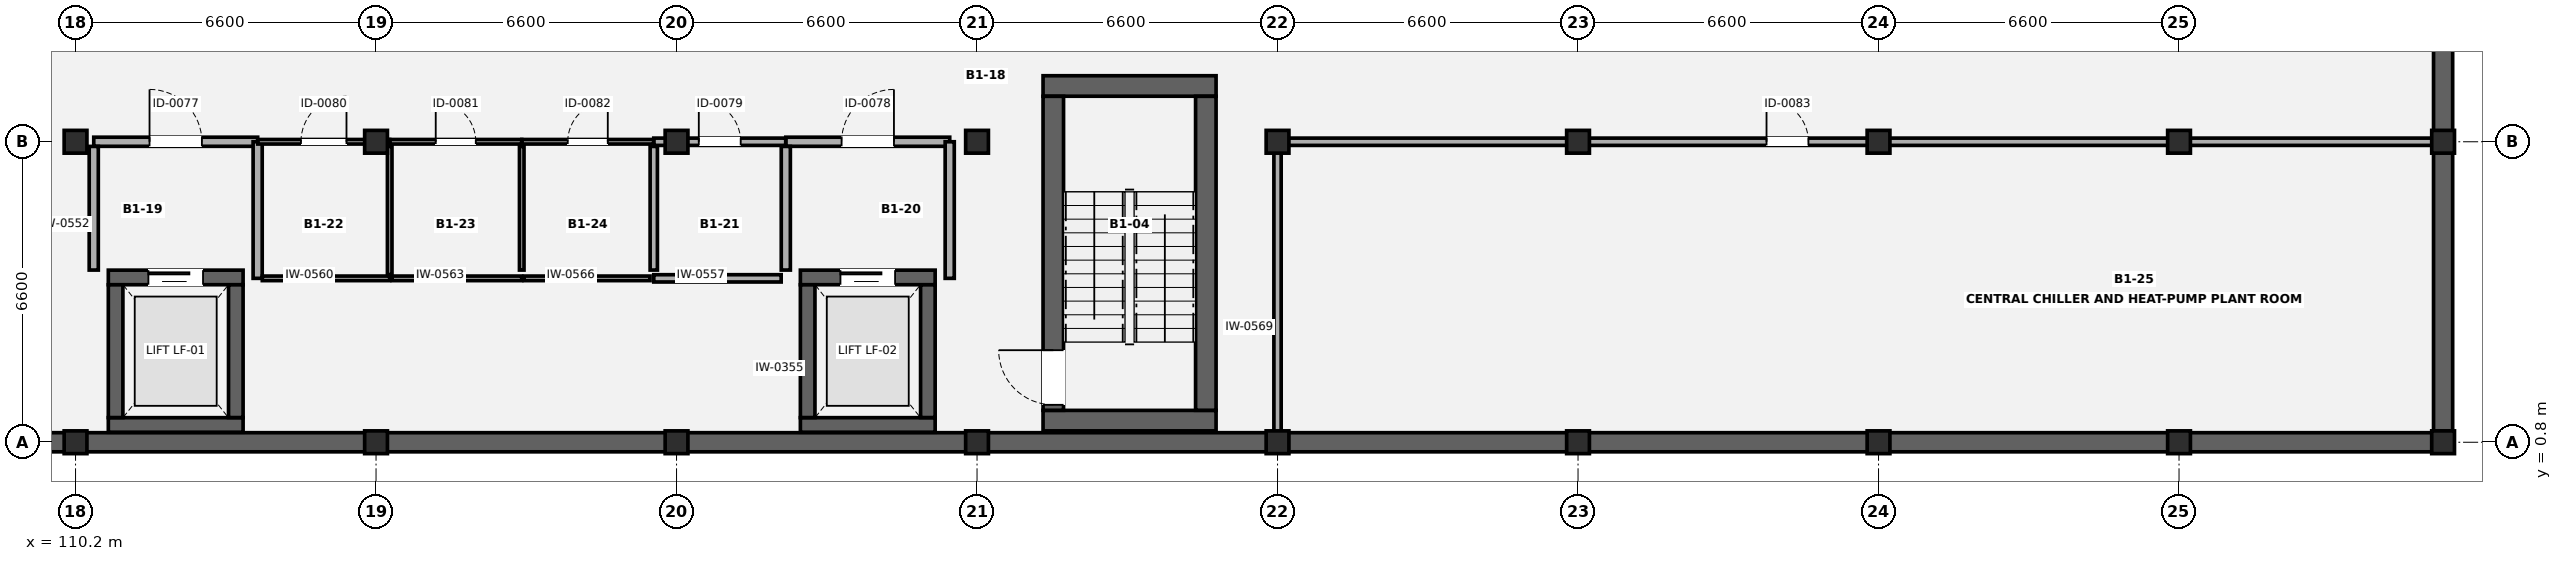
"""IFC4 building model, lengths in metres.
Left out: names, types, materials, properties, quantities, classifications, styles, units other than length and angle.
Written with IfcOpenShell. Run it as: python <this file> out.ifc"""

import sys

from ifc_helpers import new_model, si_unit, direction, frame, frame_2d, origin, origin_2d, place, context, subcontext, project, spatial, rectangle, i_section, extrude, element, fill, save


model = new_model("IFC4")
c1 = context("Model", 3, precision=1e-05, world=origin(), true_north=direction((0.0, 1.0)))
c2 = subcontext(c1, "Body", "Model", "MODEL_VIEW")
j1 = project(units=[si_unit("LENGTHUNIT", "METRE"), si_unit("PLANEANGLEUNIT", "RADIAN")], contexts=[c1])
p1 = place(None, origin())
s1 = spatial("IfcSite", under=j1, at=p1, CompositionType="ELEMENT")
p2 = place(p1, origin())
s2 = spatial("IfcBuilding", under=s1, at=p2, CompositionType="ELEMENT")
p3 = place(p2, frame((0.0, 0.0, -4.2)))
s3 = spatial("IfcBuildingStorey", under=s2, at=p3, CompositionType="ELEMENT", Elevation=-4.2)
for number, where, z_axis, x_axis in (
    (1, (110.2, 0.8, 0.0), (0.0, 0.0, 1.0), (1.0, 0.0, 0.0)),
    (2, (110.2, 7.4, 0.0), (0.0, 0.0, 1.0), (1.0, 0.0, 0.0)),
    (3, (116.8, 0.8, 0.0), (0.0, 0.0, 1.0), (1.0, 0.0, 0.0)),
    (4, (116.8, 7.4, 0.0), (0.0, 0.0, 1.0), (1.0, 0.0, 0.0)),
    (5, (123.4, 0.8, 0.0), (0.0, 0.0, 1.0), (1.0, 0.0, 0.0)),
    (6, (123.4, 7.4, 0.0), (0.0, 0.0, 1.0), (1.0, 0.0, 0.0)),
    (7, (130.0, 0.8, 0.0), (0.0, 0.0, 1.0), (1.0, 0.0, 0.0)),
    (8, (130.0, 7.4, 0.0), (0.0, 0.0, 1.0), (1.0, 0.0, 0.0)),
    (9, (136.6, 0.8, 0.0), (0.0, 0.0, 1.0), (1.0, 0.0, 0.0)),
    (10, (136.6, 7.4, 0.0), (0.0, 0.0, 1.0), (1.0, 0.0, 0.0)),
    (11, (143.2, 0.8, 0.0), (0.0, 0.0, 1.0), (1.0, 0.0, 0.0)),
    (12, (143.2, 7.4, 0.0), (0.0, 0.0, 1.0), (1.0, 0.0, 0.0)),
    (13, (149.8, 0.8, 0.0), (0.0, 0.0, 1.0), (1.0, 0.0, 0.0)),
    (14, (149.8, 7.4, 0.0), (0.0, 0.0, 1.0), (1.0, 0.0, 0.0)),
    (15, (156.4, 0.8, 0.0), (0.0, 0.0, 1.0), (1.0, 0.0, 0.0)),
    (16, (156.4, 7.4, 0.0), (0.0, 0.0, 1.0), (1.0, 0.0, 0.0)),
    (17, (162.2, 0.8, 0.0), (0.0, 0.0, 1.0), (1.0, 0.0, 0.0)),
    (18, (162.2, 7.4, 0.0), (0.0, 0.0, 1.0), (1.0, 0.0, 0.0)),
):
    element("IfcColumn", number, at=place(p3, frame(where, z_axis=z_axis, x_axis=x_axis)), inside=s3, PredefinedType="COLUMN", context=c2, shape_type="SweptSolid", body=[
        extrude(i_section(OverallWidth=0.5, OverallDepth=0.5, WebThickness=0.022, FlangeThickness=0.04, FilletRadius=0.016, at=origin_2d()), origin(), (0.0, 0.0, 1.0), 4.2),
    ])
p4 = place(p3, frame((162.2, 20.352, 0.0), z_axis=(0.0, 0.0, 1.0), x_axis=(0.0, -1.0, 0.0)))
e19 = element("IfcWall", 19, at=p4, inside=s3, PredefinedType="USERDEFINED", context=c2, shape_type="SweptSolid", body=[
    extrude(rectangle(XDim=19.304, YDim=0.42, at=frame_2d((9.652, 0.0))), origin(), (0.0, 0.0, 1.0), 3.85),
])
p5 = place(p3, frame((161.952, 0.8, 0.0), z_axis=(0.0, 0.0, 1.0), x_axis=(-1.0, 0.0, 0.0)))
e20 = element("IfcWall", 20, at=p5, inside=s3, PredefinedType="USERDEFINED", context=c2, shape_type="SweptSolid", body=[
    extrude(rectangle(XDim=58.104, YDim=0.42, at=frame_2d((29.052, 0.0))), origin(), (0.0, 0.0, 1.0), 3.85),
])
for number, where, z_axis, x_axis in (
    (21, (131.45, 1.275, 0.0), (0.0, 0.0, 1.0), (1.0, 0.0, 0.0)),
    (22, (131.45, 8.625, 0.0), (0.0, 0.0, 1.0), (1.0, 0.0, 0.0)),
):
    element("IfcWall", number, at=place(p3, frame(where, z_axis=z_axis, x_axis=x_axis)), inside=s3, PredefinedType="SHEAR", context=c2, shape_type="SweptSolid", body=[
        extrude(rectangle(XDim=3.8, YDim=0.45, at=frame_2d((1.9, 0.0))), origin(), (0.0, 0.0, 1.0), 3.94),
    ])
p6 = place(p3, frame((131.675, 1.502, 0.0), z_axis=(0.0, 0.0, 1.0), x_axis=(0.0, 1.0, 0.0)))
e23 = element("IfcWall", 23, at=p6, inside=s3, PredefinedType="SHEAR", context=c2, shape_type="SweptSolid", body=[
    extrude(rectangle(XDim=6.896, YDim=0.45, at=frame_2d((3.448, 0.0))), origin(), (0.0, 0.0, 1.0), 3.94),
])
p7 = place(p6, frame((0.12, 0.0, 0.0)))
e24 = element("IfcOpeningElement", 24, at=p7, cuts=e23, PredefinedType="OPENING", context=c2, shape_type="SweptSolid", body=[
    extrude(rectangle(XDim=1.2, YDim=2.15, at=frame_2d((0.6, 1.075))), frame((0.0, 0.235, 0.0), z_axis=(0.0, -1.0, 0.0), x_axis=(1.0, 0.0, 0.0)), (0.0, 0.0, 1.0), 0.47),
])
p8 = place(p3, frame((135.025, 1.502, 0.0), z_axis=(0.0, 0.0, 1.0), x_axis=(0.0, 1.0, 0.0)))
e25 = element("IfcWall", 25, at=p8, inside=s3, PredefinedType="SHEAR", context=c2, shape_type="SweptSolid", body=[
    extrude(rectangle(XDim=6.896, YDim=0.45, at=frame_2d((3.448, 0.0))), origin(), (0.0, 0.0, 1.0), 3.94),
])
p9 = place(p3, frame((110.92, 1.18, 0.0), z_axis=(0.0, 0.0, 1.0), x_axis=(1.0, 0.0, 0.0)))
e26 = element("IfcWall", 26, at=p9, inside=s3, PredefinedType="SHEAR", context=c2, shape_type="SweptSolid", body=[
    extrude(rectangle(XDim=2.96, YDim=0.32, at=frame_2d((1.48, 0.0))), origin(), (0.0, 0.0, 1.0), 3.94),
])
p10 = place(p3, frame((110.92, 4.42, 0.0), z_axis=(0.0, 0.0, 1.0), x_axis=(1.0, 0.0, 0.0)))
e27 = element("IfcWall", 27, at=p10, inside=s3, PredefinedType="SHEAR", context=c2, shape_type="SweptSolid", body=[
    extrude(rectangle(XDim=2.96, YDim=0.32, at=frame_2d((1.48, 0.0))), origin(), (0.0, 0.0, 1.0), 3.94),
])
p11 = place(p10, frame((0.88, 0.0, 0.0)))
e28 = element("IfcOpeningElement", 28, at=p11, cuts=e27, PredefinedType="OPENING", context=c2, shape_type="SweptSolid", body=[
    extrude(rectangle(XDim=1.2, YDim=2.2, at=frame_2d((0.6, 1.1))), frame((0.0, 0.17, 0.0), z_axis=(0.0, -1.0, 0.0), x_axis=(1.0, 0.0, 0.0)), (0.0, 0.0, 1.0), 0.34),
])
for number, where, z_axis, x_axis in (
    (29, (111.08, 1.342, 0.0), (0.0, 0.0, 1.0), (0.0, 1.0, 0.0)),
    (30, (113.72, 1.342, 0.0), (0.0, 0.0, 1.0), (0.0, 1.0, 0.0)),
):
    element("IfcWall", number, at=place(p3, frame(where, z_axis=z_axis, x_axis=x_axis)), inside=s3, PredefinedType="SHEAR", context=c2, shape_type="SweptSolid", body=[
        extrude(rectangle(XDim=2.916, YDim=0.32, at=frame_2d((1.458, 0.0))), origin(), (0.0, 0.0, 1.0), 3.94),
    ])
p12 = place(p3, frame((126.12, 1.18, 0.0), z_axis=(0.0, 0.0, 1.0), x_axis=(1.0, 0.0, 0.0)))
e31 = element("IfcWall", 31, at=p12, inside=s3, PredefinedType="SHEAR", context=c2, shape_type="SweptSolid", body=[
    extrude(rectangle(XDim=2.96, YDim=0.32, at=frame_2d((1.48, 0.0))), origin(), (0.0, 0.0, 1.0), 3.94),
])
p13 = place(p3, frame((126.12, 4.42, 0.0), z_axis=(0.0, 0.0, 1.0), x_axis=(1.0, 0.0, 0.0)))
e32 = element("IfcWall", 32, at=p13, inside=s3, PredefinedType="SHEAR", context=c2, shape_type="SweptSolid", body=[
    extrude(rectangle(XDim=2.96, YDim=0.32, at=frame_2d((1.48, 0.0))), origin(), (0.0, 0.0, 1.0), 3.94),
])
p14 = place(p13, frame((0.88, 0.0, 0.0)))
e33 = element("IfcOpeningElement", 33, at=p14, cuts=e32, PredefinedType="OPENING", context=c2, shape_type="SweptSolid", body=[
    extrude(rectangle(XDim=1.2, YDim=2.2, at=frame_2d((0.6, 1.1))), frame((0.0, 0.17, 0.0), z_axis=(0.0, -1.0, 0.0), x_axis=(1.0, 0.0, 0.0)), (0.0, 0.0, 1.0), 0.34),
])
for number, where, z_axis, x_axis in (
    (34, (126.28, 1.342, 0.0), (0.0, 0.0, 1.0), (0.0, 1.0, 0.0)),
    (35, (128.92, 1.342, 0.0), (0.0, 0.0, 1.0), (0.0, 1.0, 0.0)),
):
    element("IfcWall", number, at=place(p3, frame(where, z_axis=z_axis, x_axis=x_axis)), inside=s3, PredefinedType="SHEAR", context=c2, shape_type="SweptSolid", body=[
        extrude(rectangle(XDim=2.916, YDim=0.32, at=frame_2d((1.458, 0.0))), origin(), (0.0, 0.0, 1.0), 3.94),
    ])
p15 = place(p3, frame((110.6, 7.4, 0.0), z_axis=(0.0, 0.0, 1.0), x_axis=(1.0, 0.0, 0.0)))
e36 = element("IfcWall", 36, at=p15, inside=s3, PredefinedType="SOLIDWALL", context=c2, shape_type="SweptSolid", body=[
    extrude(rectangle(XDim=3.6, YDim=0.2, at=frame_2d((1.8, 0.0))), origin(), (0.0, 0.0, 1.0), 3.293),
])
p16 = place(p15, frame((1.225, 0.0, 0.0)))
e37 = element("IfcOpeningElement", 37, at=p16, cuts=e36, PredefinedType="OPENING", context=c2, shape_type="SweptSolid", body=[
    extrude(rectangle(XDim=1.15, YDim=2.15, at=frame_2d((0.575, 1.075))), frame((0.0, 0.11, 0.0), z_axis=(0.0, -1.0, 0.0), x_axis=(1.0, 0.0, 0.0)), (0.0, 0.0, 1.0), 0.22),
])
p17 = place(p3, frame((110.6, 4.582, 0.0), z_axis=(0.0, 0.0, 1.0), x_axis=(0.0, 1.0, 0.0)))
e38 = element("IfcWall", 38, at=p17, inside=s3, PredefinedType="SOLIDWALL", context=c2, shape_type="SweptSolid", body=[
    extrude(rectangle(XDim=2.716, YDim=0.2, at=frame_2d((1.358, 0.0))), origin(), (0.0, 0.0, 1.0), 3.94),
])
p18 = place(p3, frame((114.2, 4.4, 0.0), z_axis=(0.0, 0.0, 1.0), x_axis=(0.0, 1.0, 0.0)))
e39 = element("IfcWall", 39, at=p18, inside=s3, PredefinedType="SOLIDWALL", context=c2, shape_type="SweptSolid", body=[
    extrude(rectangle(XDim=3.0, YDim=0.2, at=frame_2d((1.5, 0.0))), origin(), (0.0, 0.0, 1.0), 3.94),
])
p19 = place(p3, frame((125.8, 7.4, 0.0), z_axis=(0.0, 0.0, 1.0), x_axis=(1.0, 0.0, 0.0)))
e40 = element("IfcWall", 40, at=p19, inside=s3, PredefinedType="SOLIDWALL", context=c2, shape_type="SweptSolid", body=[
    extrude(rectangle(XDim=3.6, YDim=0.2, at=frame_2d((1.8, 0.0))), origin(), (0.0, 0.0, 1.0), 3.293),
])
p20 = place(p19, frame((1.225, 0.0, 0.0)))
e41 = element("IfcOpeningElement", 41, at=p20, cuts=e40, PredefinedType="OPENING", context=c2, shape_type="SweptSolid", body=[
    extrude(rectangle(XDim=1.15, YDim=2.15, at=frame_2d((0.575, 1.075))), frame((0.0, 0.11, 0.0), z_axis=(0.0, -1.0, 0.0), x_axis=(1.0, 0.0, 0.0)), (0.0, 0.0, 1.0), 0.22),
])
p21 = place(p3, frame((125.8, 4.582, 0.0), z_axis=(0.0, 0.0, 1.0), x_axis=(0.0, 1.0, 0.0)))
e42 = element("IfcWall", 42, at=p21, inside=s3, PredefinedType="SOLIDWALL", context=c2, shape_type="SweptSolid", body=[
    extrude(rectangle(XDim=2.716, YDim=0.2, at=frame_2d((1.358, 0.0))), origin(), (0.0, 0.0, 1.0), 3.94),
])
p22 = place(p3, frame((129.4, 4.4, 0.0), z_axis=(0.0, 0.0, 1.0), x_axis=(0.0, 1.0, 0.0)))
e43 = element("IfcWall", 43, at=p22, inside=s3, PredefinedType="SOLIDWALL", context=c2, shape_type="SweptSolid", body=[
    extrude(rectangle(XDim=3.0, YDim=0.2, at=frame_2d((1.5, 0.0))), origin(), (0.0, 0.0, 1.0), 3.94),
])
p23 = place(p3, frame((122.9, 4.4, 0.0), z_axis=(0.0, 0.0, 1.0), x_axis=(1.0, 0.0, 0.0)))
e44 = element("IfcWall", 44, at=p23, inside=s3, PredefinedType="PARTITIONING", context=c2, shape_type="SweptSolid", body=[
    extrude(rectangle(XDim=2.798, YDim=0.16, at=frame_2d((1.399, 0.0))), origin(), (0.0, 0.0, 1.0), 3.546),
])
p24 = place(p3, frame((122.9, 7.4, 0.0), z_axis=(0.0, 0.0, 1.0), x_axis=(1.0, 0.0, 0.0)))
e45 = element("IfcWall", 45, at=p24, inside=s3, PredefinedType="PARTITIONING", context=c2, shape_type="SweptSolid", body=[
    extrude(rectangle(XDim=2.898, YDim=0.16, at=frame_2d((1.449, 0.0))), origin(), (0.0, 0.0, 1.0), 3.293),
])
p25 = place(p24, frame((0.989, 0.0, 0.0)))
e46 = element("IfcOpeningElement", 46, at=p25, cuts=e45, PredefinedType="OPENING", context=c2, shape_type="SweptSolid", body=[
    extrude(rectangle(XDim=0.92, YDim=2.12, at=frame_2d((0.46, 1.06))), frame((0.0, 0.09, 0.0), z_axis=(0.0, -1.0, 0.0), x_axis=(1.0, 0.0, 0.0)), (0.0, 0.0, 1.0), 0.18),
])
p26 = place(p3, frame((122.9, 4.582, 0.0), z_axis=(0.0, 0.0, 1.0), x_axis=(0.0, 1.0, 0.0)))
e47 = element("IfcWall", 47, at=p26, inside=s3, PredefinedType="PARTITIONING", context=c2, shape_type="SweptSolid", body=[
    extrude(rectangle(XDim=2.716, YDim=0.16, at=frame_2d((1.358, 0.0))), origin(), (0.0, 0.0, 1.0), 3.94),
])
p27 = place(p3, frame((114.302, 4.4, 0.0), z_axis=(0.0, 0.0, 1.0), x_axis=(1.0, 0.0, 0.0)))
e48 = element("IfcWall", 48, at=p27, inside=s3, PredefinedType="PARTITIONING", context=c2, shape_type="SweptSolid", body=[
    extrude(rectangle(XDim=2.798, YDim=0.1, at=frame_2d((1.399, 0.0))), origin(), (0.0, 0.0, 1.0), 3.94),
])
p28 = place(p3, frame((114.202, 7.4, 0.0), z_axis=(0.0, 0.0, 1.0), x_axis=(1.0, 0.0, 0.0)))
e49 = element("IfcWall", 49, at=p28, inside=s3, PredefinedType="PARTITIONING", context=c2, shape_type="SweptSolid", body=[
    extrude(rectangle(XDim=2.898, YDim=0.1, at=frame_2d((1.449, 0.0))), origin(), (0.0, 0.0, 1.0), 3.293),
])
p29 = place(p28, frame((0.949, 0.0, 0.0)))
e50 = element("IfcOpeningElement", 50, at=p29, cuts=e49, PredefinedType="OPENING", context=c2, shape_type="SweptSolid", body=[
    extrude(rectangle(XDim=1.0, YDim=2.1, at=frame_2d((0.5, 1.05))), frame((0.0, 0.06, 0.0), z_axis=(0.0, -1.0, 0.0), x_axis=(1.0, 0.0, 0.0)), (0.0, 0.0, 1.0), 0.12),
])
p30 = place(p3, frame((117.1, 4.482, 0.0), z_axis=(0.0, 0.0, 1.0), x_axis=(0.0, 1.0, 0.0)))
e51 = element("IfcWall", 51, at=p30, inside=s3, PredefinedType="PARTITIONING", context=c2, shape_type="SweptSolid", body=[
    extrude(rectangle(XDim=2.816, YDim=0.1, at=frame_2d((1.408, 0.0))), origin(), (0.0, 0.0, 1.0), 3.94),
])
p31 = place(p3, frame((117.152, 4.4, 0.0), z_axis=(0.0, 0.0, 1.0), x_axis=(1.0, 0.0, 0.0)))
e52 = element("IfcWall", 52, at=p31, inside=s3, PredefinedType="PARTITIONING", context=c2, shape_type="SweptSolid", body=[
    extrude(rectangle(XDim=2.848, YDim=0.1, at=frame_2d((1.424, 0.0))), origin(), (0.0, 0.0, 1.0), 3.94),
])
p32 = place(p3, frame((117.102, 7.4, 0.0), z_axis=(0.0, 0.0, 1.0), x_axis=(1.0, 0.0, 0.0)))
e53 = element("IfcWall", 53, at=p32, inside=s3, PredefinedType="PARTITIONING", context=c2, shape_type="SweptSolid", body=[
    extrude(rectangle(XDim=2.898, YDim=0.1, at=frame_2d((1.449, 0.0))), origin(), (0.0, 0.0, 1.0), 3.293),
])
p33 = place(p32, frame((1.009, 0.0, 0.0)))
e54 = element("IfcOpeningElement", 54, at=p33, cuts=e53, PredefinedType="OPENING", context=c2, shape_type="SweptSolid", body=[
    extrude(rectangle(XDim=0.88, YDim=2.08, at=frame_2d((0.44, 1.04))), frame((0.0, 0.06, 0.0), z_axis=(0.0, -1.0, 0.0), x_axis=(1.0, 0.0, 0.0)), (0.0, 0.0, 1.0), 0.12),
])
p34 = place(p3, frame((120.0, 4.582, 0.0), z_axis=(0.0, 0.0, 1.0), x_axis=(0.0, 1.0, 0.0)))
e55 = element("IfcWall", 55, at=p34, inside=s3, PredefinedType="PARTITIONING", context=c2, shape_type="SweptSolid", body=[
    extrude(rectangle(XDim=2.716, YDim=0.1, at=frame_2d((1.358, 0.0))), origin(), (0.0, 0.0, 1.0), 3.94),
])
p35 = place(p3, frame((120.052, 4.4, 0.0), z_axis=(0.0, 0.0, 1.0), x_axis=(1.0, 0.0, 0.0)))
e56 = element("IfcWall", 56, at=p35, inside=s3, PredefinedType="PARTITIONING", context=c2, shape_type="SweptSolid", body=[
    extrude(rectangle(XDim=2.766, YDim=0.1, at=frame_2d((1.383, 0.0))), origin(), (0.0, 0.0, 1.0), 3.94),
])
p36 = place(p3, frame((120.002, 7.4, 0.0), z_axis=(0.0, 0.0, 1.0), x_axis=(1.0, 0.0, 0.0)))
e57 = element("IfcWall", 57, at=p36, inside=s3, PredefinedType="PARTITIONING", context=c2, shape_type="SweptSolid", body=[
    extrude(rectangle(XDim=2.896, YDim=0.1, at=frame_2d((1.448, 0.0))), origin(), (0.0, 0.0, 1.0), 3.293),
])
p37 = place(p36, frame((1.008, 0.0, 0.0)))
e58 = element("IfcOpeningElement", 58, at=p37, cuts=e57, PredefinedType="OPENING", context=c2, shape_type="SweptSolid", body=[
    extrude(rectangle(XDim=0.88, YDim=2.08, at=frame_2d((0.44, 1.04))), frame((0.0, 0.06, 0.0), z_axis=(0.0, -1.0, 0.0), x_axis=(1.0, 0.0, 0.0)), (0.0, 0.0, 1.0), 0.12),
])
p38 = place(p3, frame((136.6, 7.4, 0.0), z_axis=(0.0, 0.0, 1.0), x_axis=(1.0, 0.0, 0.0)))
e59 = element("IfcWall", 59, at=p38, inside=s3, PredefinedType="PARTITIONING", context=c2, shape_type="SweptSolid", body=[
    extrude(rectangle(XDim=25.6, YDim=0.16, at=frame_2d((12.8, 0.0))), origin(), (0.0, 0.0, 1.0), 3.293),
])
p39 = place(p38, frame((10.74, 0.0, 0.0)))
e60 = element("IfcOpeningElement", 60, at=p39, cuts=e59, PredefinedType="OPENING", context=c2, shape_type="SweptSolid", body=[
    extrude(rectangle(XDim=0.92, YDim=2.12, at=frame_2d((0.46, 1.06))), frame((0.0, 0.09, 0.0), z_axis=(0.0, -1.0, 0.0), x_axis=(1.0, 0.0, 0.0)), (0.0, 0.0, 1.0), 0.18),
])
p40 = place(p3, frame((136.6, 0.992, 0.0), z_axis=(0.0, 0.0, 1.0), x_axis=(0.0, 1.0, 0.0)))
e61 = element("IfcWall", 61, at=p40, inside=s3, PredefinedType="PARTITIONING", context=c2, shape_type="SweptSolid", body=[
    extrude(rectangle(XDim=6.326, YDim=0.16, at=frame_2d((3.163, 0.0))), origin(), (0.0, 0.0, 1.0), 3.372),
])
p41 = place(p7, origin())
e62 = element("IfcDoor", 62, at=p41, inside=s3, OperationType="SINGLE_SWING_RIGHT", PredefinedType="DOOR", context=c2, shape_type="SweptSolid", body=[
    extrude(rectangle(XDim=1.2, YDim=2.15, at=frame_2d((0.6, 1.075))), frame((0.0, 0.025, 0.0), z_axis=(0.0, -1.0, 0.0), x_axis=(1.0, 0.0, 0.0)), (0.0, 0.0, 1.0), 0.05),
])
fill(e24, e62)
p42 = place(p11, origin())
e63 = element("IfcDoor", 63, at=p42, inside=s3, OperationType="SLIDING_TO_LEFT", PredefinedType="DOOR", context=c2, shape_type="SweptSolid", body=[
    extrude(rectangle(XDim=1.2, YDim=2.2, at=frame_2d((0.6, 1.1))), frame((0.0, 0.025, 0.0), z_axis=(0.0, -1.0, 0.0), x_axis=(1.0, 0.0, 0.0)), (0.0, 0.0, 1.0), 0.05),
])
fill(e28, e63)
p43 = place(p14, origin())
e64 = element("IfcDoor", 64, at=p43, inside=s3, OperationType="SLIDING_TO_LEFT", PredefinedType="DOOR", context=c2, shape_type="SweptSolid", body=[
    extrude(rectangle(XDim=1.2, YDim=2.2, at=frame_2d((0.6, 1.1))), frame((0.0, 0.025, 0.0), z_axis=(0.0, -1.0, 0.0), x_axis=(1.0, 0.0, 0.0)), (0.0, 0.0, 1.0), 0.05),
])
fill(e33, e64)
p44 = place(p16, origin())
e65 = element("IfcDoor", 65, at=p44, inside=s3, OperationType="SINGLE_SWING_LEFT", PredefinedType="DOOR", context=c2, shape_type="SweptSolid", body=[
    extrude(rectangle(XDim=1.15, YDim=2.15, at=frame_2d((0.575, 1.075))), frame((0.0, 0.025, 0.0), z_axis=(0.0, -1.0, 0.0), x_axis=(1.0, 0.0, 0.0)), (0.0, 0.0, 1.0), 0.05),
])
fill(e37, e65)
p45 = place(p20, origin())
e66 = element("IfcDoor", 66, at=p45, inside=s3, OperationType="SINGLE_SWING_RIGHT", PredefinedType="DOOR", context=c2, shape_type="SweptSolid", body=[
    extrude(rectangle(XDim=1.15, YDim=2.15, at=frame_2d((0.575, 1.075))), frame((0.0, 0.025, 0.0), z_axis=(0.0, -1.0, 0.0), x_axis=(1.0, 0.0, 0.0)), (0.0, 0.0, 1.0), 0.05),
])
fill(e41, e66)
p46 = place(p25, origin())
e67 = element("IfcDoor", 67, at=p46, inside=s3, OperationType="SINGLE_SWING_LEFT", PredefinedType="DOOR", context=c2, shape_type="SweptSolid", body=[
    extrude(rectangle(XDim=0.92, YDim=2.12, at=frame_2d((0.46, 1.06))), frame((0.0, 0.025, 0.0), z_axis=(0.0, -1.0, 0.0), x_axis=(1.0, 0.0, 0.0)), (0.0, 0.0, 1.0), 0.05),
])
fill(e46, e67)
p47 = place(p29, origin())
e68 = element("IfcDoor", 68, at=p47, inside=s3, OperationType="SINGLE_SWING_RIGHT", PredefinedType="DOOR", context=c2, shape_type="SweptSolid", body=[
    extrude(rectangle(XDim=1.0, YDim=2.1, at=frame_2d((0.5, 1.05))), frame((0.0, 0.025, 0.0), z_axis=(0.0, -1.0, 0.0), x_axis=(1.0, 0.0, 0.0)), (0.0, 0.0, 1.0), 0.05),
])
fill(e50, e68)
p48 = place(p33, origin())
e69 = element("IfcDoor", 69, at=p48, inside=s3, OperationType="SINGLE_SWING_LEFT", PredefinedType="DOOR", context=c2, shape_type="SweptSolid", body=[
    extrude(rectangle(XDim=0.88, YDim=2.08, at=frame_2d((0.44, 1.04))), frame((0.0, 0.025, 0.0), z_axis=(0.0, -1.0, 0.0), x_axis=(1.0, 0.0, 0.0)), (0.0, 0.0, 1.0), 0.05),
])
fill(e54, e69)
p49 = place(p37, origin())
e70 = element("IfcDoor", 70, at=p49, inside=s3, OperationType="SINGLE_SWING_RIGHT", PredefinedType="DOOR", context=c2, shape_type="SweptSolid", body=[
    extrude(rectangle(XDim=0.88, YDim=2.08, at=frame_2d((0.44, 1.04))), frame((0.0, 0.025, 0.0), z_axis=(0.0, -1.0, 0.0), x_axis=(1.0, 0.0, 0.0)), (0.0, 0.0, 1.0), 0.05),
])
fill(e58, e70)
p50 = place(p39, origin())
e71 = element("IfcDoor", 71, at=p50, inside=s3, OperationType="SINGLE_SWING_LEFT", PredefinedType="DOOR", context=c2, shape_type="SweptSolid", body=[
    extrude(rectangle(XDim=0.92, YDim=2.12, at=frame_2d((0.46, 1.06))), frame((0.0, 0.025, 0.0), z_axis=(0.0, -1.0, 0.0), x_axis=(1.0, 0.0, 0.0)), (0.0, 0.0, 1.0), 0.05),
])
fill(e60, e71)
save(model, sys.argv[1])
